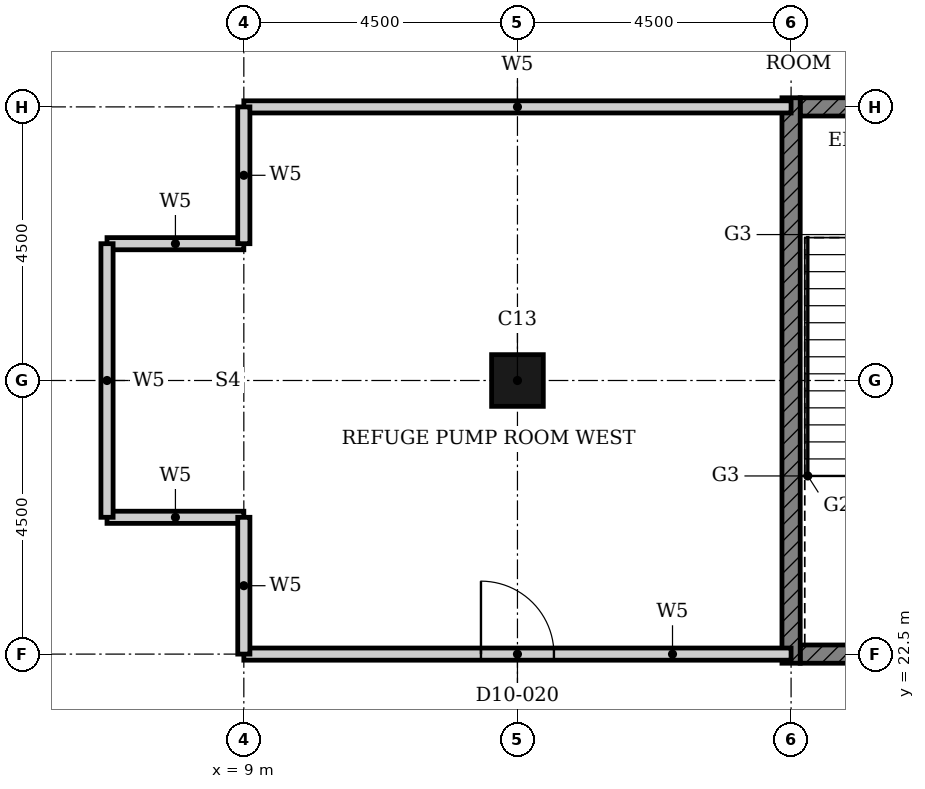
"""IFC4 building model, lengths in metres.
Left out: names, types, materials, properties, quantities, classifications, styles, units other than length and angle.
Written with IfcOpenShell. Run it as: python <this file> out.ifc"""

import sys

from ifc_helpers import new_model, si_unit, direction, frame, frame_2d, origin, origin_2d, place, context, subcontext, project, spatial, rectangle, hollow_rectangle, extrude, element, fill, save


model = new_model("IFC4")
c1 = context("Model", 3, precision=1e-05, world=origin(), true_north=direction((0.0, 1.0)))
c2 = subcontext(c1, "Body", "Model", "MODEL_VIEW")
j1 = project(units=[si_unit("LENGTHUNIT", "METRE"), si_unit("PLANEANGLEUNIT", "RADIAN")], contexts=[c1])
p1 = place(None, origin())
s1 = spatial("IfcSite", under=j1, at=p1, CompositionType="ELEMENT")
p2 = place(p1, origin())
s2 = spatial("IfcBuilding", under=s1, at=p2, CompositionType="ELEMENT")
p3 = place(p2, frame((0.0, 0.0, 48.0)))
s3 = spatial("IfcBuildingStorey", under=s2, at=p3, CompositionType="ELEMENT", Elevation=48.0)
p4 = place(p3, frame((13.5, 27.0, 0.0), z_axis=(0.0, 0.0, 1.0), x_axis=(1.0, 0.0, 0.0)))
e1 = element("IfcColumn", 1, at=p4, inside=s3, PredefinedType="COLUMN", context=c2, shape_type="SweptSolid", body=[
    extrude(hollow_rectangle(XDim=0.85, YDim=0.85, WallThickness=0.026, at=origin_2d()), origin(), (0.0, 0.0, 1.0), 4.8),
])
p5 = place(p3, frame((18.15, 22.5, 0.0), z_axis=(0.0, 0.0, 1.0), x_axis=(1.0, 0.0, 0.0)))
e2 = element("IfcWall", 2, at=p5, inside=s3, PredefinedType="SHEAR", context=c2, shape_type="SweptSolid", body=[
    extrude(rectangle(XDim=4.225, YDim=0.3, at=frame_2d((2.113, 0.0))), origin(), (0.0, 0.0, 1.0), 4.5),
])
p6 = place(p3, frame((18.15, 31.5, 0.0), z_axis=(0.0, 0.0, 1.0), x_axis=(1.0, 0.0, 0.0)))
e3 = element("IfcWall", 3, at=p6, inside=s3, PredefinedType="SHEAR", context=c2, shape_type="SweptSolid", body=[
    extrude(rectangle(XDim=6.797, YDim=0.3, at=frame_2d((3.398, 0.0))), origin(), (0.0, 0.0, 1.0), 4.5),
])
p7 = place(p6, frame((4.736, 0.0, 0.0)))
e4 = element("IfcOpeningElement", 4, at=p7, cuts=e3, PredefinedType="OPENING", context=c2, shape_type="SweptSolid", body=[
    extrude(rectangle(XDim=1.8, YDim=2.1, at=frame_2d((0.9, 1.05))), frame((0.0, 0.16, 0.0), z_axis=(0.0, -1.0, 0.0), x_axis=(1.0, 0.0, 0.0)), (0.0, 0.0, 1.0), 0.32),
])
p8 = place(p3, frame((18.0, 22.35, 0.0), z_axis=(0.0, 0.0, 1.0), x_axis=(0.0, 1.0, 0.0)))
e5 = element("IfcWall", 5, at=p8, inside=s3, PredefinedType="SHEAR", context=c2, shape_type="SweptSolid", body=[
    extrude(rectangle(XDim=9.3, YDim=0.3, at=frame_2d((4.65, 0.0))), origin(), (0.0, 0.0, 1.0), 4.5),
])
p9 = place(p3, frame((9.0, 22.5, 0.0), z_axis=(0.0, 0.0, 1.0), x_axis=(1.0, 0.0, 0.0)))
e6 = element("IfcWall", 6, at=p9, inside=s3, PredefinedType="PARTITIONING", context=c2, shape_type="SweptSolid", body=[
    extrude(rectangle(XDim=9.0, YDim=0.2, at=frame_2d((4.5, 0.0))), origin(), (0.0, 0.0, 1.0), 3.78),
])
p10 = place(p9, frame((3.9, 0.0, 0.0)))
e7 = element("IfcOpeningElement", 7, at=p10, cuts=e6, PredefinedType="OPENING", context=c2, shape_type="SweptSolid", body=[
    extrude(rectangle(XDim=1.2, YDim=2.1, at=frame_2d((0.6, 1.05))), frame((0.0, 0.11, 0.0), z_axis=(0.0, -1.0, 0.0), x_axis=(1.0, 0.0, 0.0)), (0.0, 0.0, 1.0), 0.22),
])
for number, where, z_axis, x_axis in (
    (8, (6.75, 24.75, 0.0), (0.0, 0.0, 1.0), (1.0, 0.0, 0.0)),
    (9, (6.75, 29.25, 0.0), (0.0, 0.0, 1.0), (1.0, 0.0, 0.0)),
):
    element("IfcWall", number, at=place(p3, frame(where, z_axis=z_axis, x_axis=x_axis)), inside=s3, PredefinedType="PARTITIONING", context=c2, shape_type="SweptSolid", body=[
        extrude(rectangle(XDim=2.25, YDim=0.2, at=frame_2d((1.125, 0.0))), origin(), (0.0, 0.0, 1.0), 4.5),
    ])
p11 = place(p3, frame((9.0, 31.5, 0.0), z_axis=(0.0, 0.0, 1.0), x_axis=(1.0, 0.0, 0.0)))
e10 = element("IfcWall", 10, at=p11, inside=s3, PredefinedType="PARTITIONING", context=c2, shape_type="SweptSolid", body=[
    extrude(rectangle(XDim=9.0, YDim=0.2, at=frame_2d((4.5, 0.0))), origin(), (0.0, 0.0, 1.0), 3.78),
])
p12 = place(p3, frame((6.75, 24.75, 0.0), z_axis=(0.0, 0.0, 1.0), x_axis=(0.0, 1.0, 0.0)))
e11 = element("IfcWall", 11, at=p12, inside=s3, PredefinedType="PARTITIONING", context=c2, shape_type="SweptSolid", body=[
    extrude(rectangle(XDim=4.5, YDim=0.2, at=frame_2d((2.25, 0.0))), origin(), (0.0, 0.0, 1.0), 4.5),
])
for number, where, z_axis, x_axis in (
    (12, (9.0, 22.5, 0.0), (0.0, 0.0, 1.0), (0.0, 1.0, 0.0)),
    (13, (9.0, 29.25, 0.0), (0.0, 0.0, 1.0), (0.0, 1.0, 0.0)),
):
    element("IfcWall", number, at=place(p3, frame(where, z_axis=z_axis, x_axis=x_axis)), inside=s3, PredefinedType="PARTITIONING", context=c2, shape_type="SweptSolid", body=[
        extrude(rectangle(XDim=2.25, YDim=0.2, at=frame_2d((1.125, 0.0))), origin(), (0.0, 0.0, 1.0), 4.5),
    ])
p13 = place(p10, origin())
e14 = element("IfcDoor", 14, at=p13, inside=s3, OperationType="SINGLE_SWING_LEFT", PredefinedType="DOOR", context=c2, shape_type="SweptSolid", body=[
    extrude(rectangle(XDim=1.2, YDim=2.1, at=frame_2d((0.6, 1.05))), frame((0.0, 0.025, 0.0), z_axis=(0.0, -1.0, 0.0), x_axis=(1.0, 0.0, 0.0)), (0.0, 0.0, 1.0), 0.05),
])
fill(e7, e14)
save(model, sys.argv[1])
